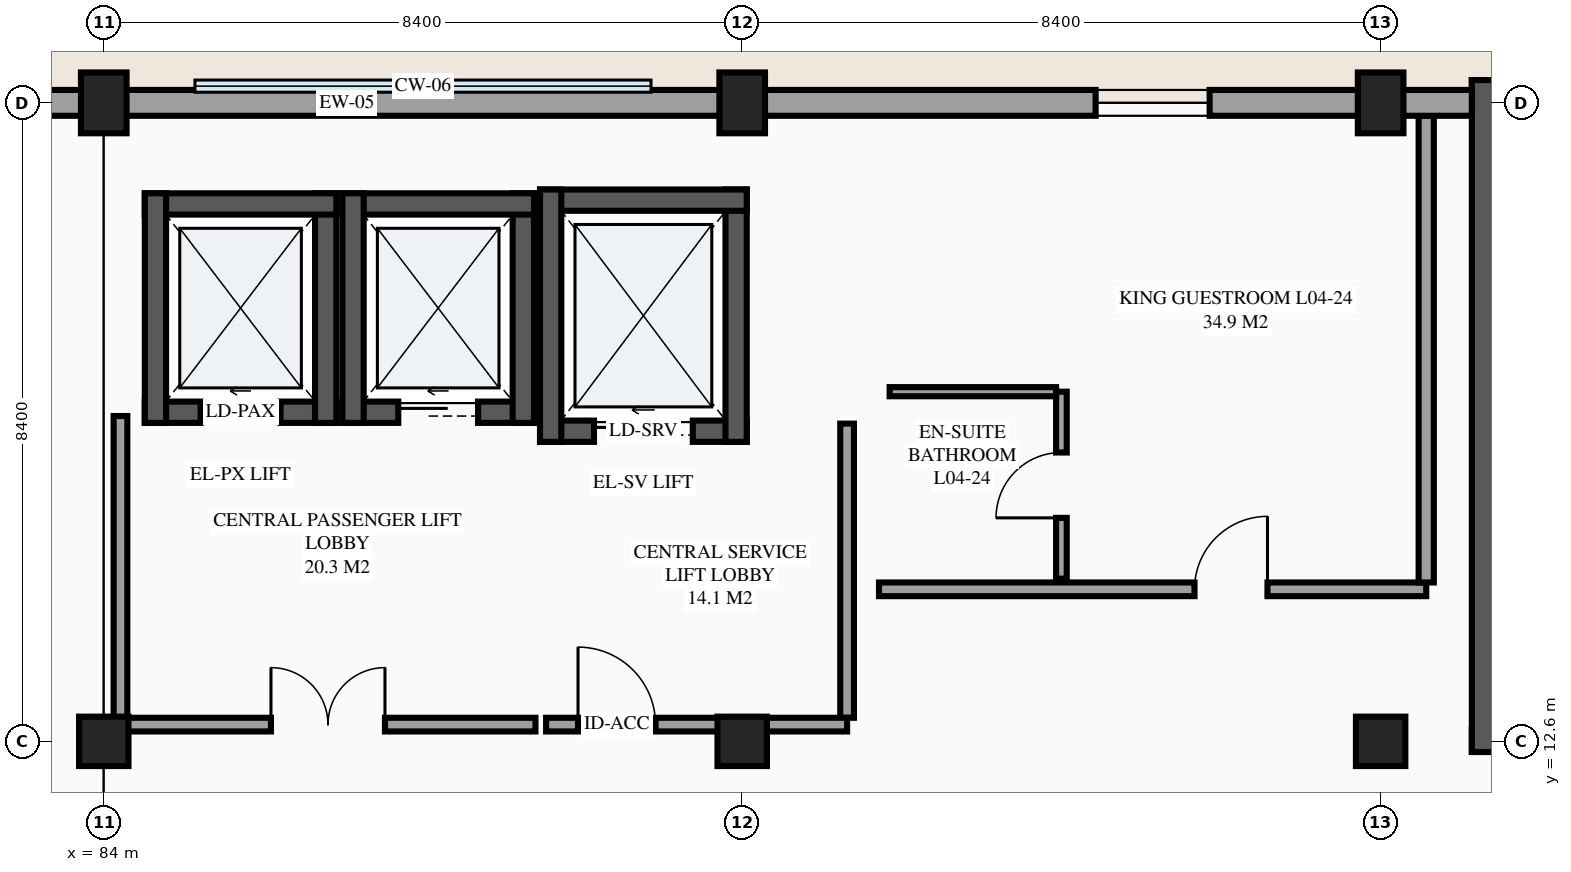
"""IFC4 building model, lengths in metres.
Left out: names, types, materials, properties, quantities, classifications, styles, units other than length and angle.
Written with IfcOpenShell. Run it as: python <this file> out.ifc"""

import sys

from ifc_helpers import new_model, si_unit, direction, frame, frame_2d, origin, origin_2d, place, context, subcontext, project, spatial, rectangle, extrude, element, fill, save


model = new_model("IFC4")
c1 = context("Model", 3, precision=1e-05, world=origin(), true_north=direction((0.0, 1.0)))
c2 = subcontext(c1, "Body", "Model", "MODEL_VIEW")
j1 = project(units=[si_unit("LENGTHUNIT", "METRE"), si_unit("PLANEANGLEUNIT", "RADIAN")], contexts=[c1])
p1 = place(None, origin())
s1 = spatial("IfcSite", under=j1, at=p1, CompositionType="ELEMENT")
p2 = place(p1, origin())
s2 = spatial("IfcBuilding", under=s1, at=p2, CompositionType="ELEMENT")
p3 = place(p2, frame((0.0, 0.0, 18.3)))
s3 = spatial("IfcBuildingStorey", under=s2, at=p3, CompositionType="ELEMENT", Elevation=18.3)
p4 = place(p3, frame((84.0, 12.6, 0.0), z_axis=(0.0, 0.0, 1.0), x_axis=(1.0, 0.0, 0.0)))
e1 = element("IfcColumn", 1, at=p4, inside=s3, PredefinedType="COLUMN", context=c2, shape_type="SweptSolid", body=[
    extrude(rectangle(XDim=0.65, YDim=0.65, at=origin_2d()), origin(), (0.0, 0.0, 1.0), 3.6),
])
p5 = place(p3, frame((84.0, 21.0, 0.0), z_axis=(0.0, 0.0, 1.0), x_axis=(1.0, 0.0, 0.0)))
e2 = element("IfcColumn", 2, at=p5, inside=s3, PredefinedType="COLUMN", context=c2, shape_type="SweptSolid", body=[
    extrude(rectangle(XDim=0.6, YDim=0.8, at=origin_2d()), origin(), (0.0, 0.0, 1.0), 3.6),
])
p6 = place(p3, frame((92.4, 12.6, 0.0), z_axis=(0.0, 0.0, 1.0), x_axis=(1.0, 0.0, 0.0)))
e3 = element("IfcColumn", 3, at=p6, inside=s3, PredefinedType="COLUMN", context=c2, shape_type="SweptSolid", body=[
    extrude(rectangle(XDim=0.65, YDim=0.65, at=origin_2d()), origin(), (0.0, 0.0, 1.0), 3.6),
])
p7 = place(p3, frame((92.4, 21.0, 0.0), z_axis=(0.0, 0.0, 1.0), x_axis=(1.0, 0.0, 0.0)))
e4 = element("IfcColumn", 4, at=p7, inside=s3, PredefinedType="COLUMN", context=c2, shape_type="SweptSolid", body=[
    extrude(rectangle(XDim=0.6, YDim=0.8, at=origin_2d()), origin(), (0.0, 0.0, 1.0), 3.6),
])
p8 = place(p3, frame((100.8, 12.6, 0.0), z_axis=(0.0, 0.0, 1.0), x_axis=(1.0, 0.0, 0.0)))
e5 = element("IfcColumn", 5, at=p8, inside=s3, PredefinedType="COLUMN", context=c2, shape_type="SweptSolid", body=[
    extrude(rectangle(XDim=0.65, YDim=0.65, at=origin_2d()), origin(), (0.0, 0.0, 1.0), 3.6),
])
p9 = place(p3, frame((100.8, 21.0, 0.0), z_axis=(0.0, 0.0, 1.0), x_axis=(1.0, 0.0, 0.0)))
e6 = element("IfcColumn", 6, at=p9, inside=s3, PredefinedType="COLUMN", context=c2, shape_type="SweptSolid", body=[
    extrude(rectangle(XDim=0.6, YDim=0.8, at=origin_2d()), origin(), (0.0, 0.0, 1.0), 3.6),
])
p10 = place(p3, frame((92.4, 21.0, 0.0), z_axis=(0.0, 0.0, 1.0), x_axis=(-1.0, 0.0, 0.0)))
e7 = element("IfcWall", 7, at=p10, inside=s3, PredefinedType="STANDARD", context=c2, shape_type="SweptSolid", body=[
    extrude(rectangle(XDim=10.4, YDim=0.34, at=frame_2d((5.2, 0.0))), origin(), (0.0, 0.0, 1.0), 2.68),
])
p11 = place(p3, frame((84.54, 16.93, 0.0), z_axis=(0.0, 0.0, 1.0), x_axis=(1.0, 0.0, 0.0)))
e8 = element("IfcWall", 8, at=p11, inside=s3, PredefinedType="SHEAR", context=c2, shape_type="SweptSolid", body=[
    extrude(rectangle(XDim=2.52, YDim=0.28, at=frame_2d((1.26, 0.0))), origin(), (0.0, 0.0, 1.0), 3.6),
])
p12 = place(p11, frame((0.735, 0.0, 0.0)))
e9 = element("IfcOpeningElement", 9, at=p12, cuts=e8, PredefinedType="OPENING", context=c2, shape_type="SweptSolid", body=[
    extrude(rectangle(XDim=1.05, YDim=2.2, at=frame_2d((0.525, 1.1))), frame((0.0, 0.15, 0.0), z_axis=(0.0, -1.0, 0.0), x_axis=(1.0, 0.0, 0.0)), (0.0, 0.0, 1.0), 0.3),
])
p13 = place(p3, frame((86.92, 16.79, 0.0), z_axis=(0.0, 0.0, 1.0), x_axis=(0.0, 1.0, 0.0)))
e10 = element("IfcWall", 10, at=p13, inside=s3, PredefinedType="SHEAR", context=c2, shape_type="SweptSolid", body=[
    extrude(rectangle(XDim=3.02, YDim=0.28, at=frame_2d((1.51, 0.0))), origin(), (0.0, 0.0, 1.0), 3.6),
])
p14 = place(p3, frame((87.06, 19.67, 0.0), z_axis=(0.0, 0.0, 1.0), x_axis=(-1.0, 0.0, 0.0)))
e11 = element("IfcWall", 11, at=p14, inside=s3, PredefinedType="SHEAR", context=c2, shape_type="SweptSolid", body=[
    extrude(rectangle(XDim=2.52, YDim=0.28, at=frame_2d((1.26, 0.0))), origin(), (0.0, 0.0, 1.0), 3.6),
])
p15 = place(p3, frame((84.68, 19.81, 0.0), z_axis=(0.0, 0.0, 1.0), x_axis=(0.0, -1.0, 0.0)))
e12 = element("IfcWall", 12, at=p15, inside=s3, PredefinedType="SHEAR", context=c2, shape_type="SweptSolid", body=[
    extrude(rectangle(XDim=3.02, YDim=0.28, at=frame_2d((1.51, 0.0))), origin(), (0.0, 0.0, 1.0), 3.6),
])
p16 = place(p3, frame((87.14, 16.93, 0.0), z_axis=(0.0, 0.0, 1.0), x_axis=(1.0, 0.0, 0.0)))
e13 = element("IfcWall", 13, at=p16, inside=s3, PredefinedType="SHEAR", context=c2, shape_type="SweptSolid", body=[
    extrude(rectangle(XDim=2.52, YDim=0.28, at=frame_2d((1.26, 0.0))), origin(), (0.0, 0.0, 1.0), 3.6),
])
p17 = place(p16, frame((0.735, 0.0, 0.0)))
e14 = element("IfcOpeningElement", 14, at=p17, cuts=e13, PredefinedType="OPENING", context=c2, shape_type="SweptSolid", body=[
    extrude(rectangle(XDim=1.05, YDim=2.2, at=frame_2d((0.525, 1.1))), frame((0.0, 0.15, 0.0), z_axis=(0.0, -1.0, 0.0), x_axis=(1.0, 0.0, 0.0)), (0.0, 0.0, 1.0), 0.3),
])
p18 = place(p3, frame((89.52, 16.79, 0.0), z_axis=(0.0, 0.0, 1.0), x_axis=(0.0, 1.0, 0.0)))
e15 = element("IfcWall", 15, at=p18, inside=s3, PredefinedType="SHEAR", context=c2, shape_type="SweptSolid", body=[
    extrude(rectangle(XDim=3.02, YDim=0.28, at=frame_2d((1.51, 0.0))), origin(), (0.0, 0.0, 1.0), 3.6),
])
p19 = place(p3, frame((89.66, 19.67, 0.0), z_axis=(0.0, 0.0, 1.0), x_axis=(-1.0, 0.0, 0.0)))
e16 = element("IfcWall", 16, at=p19, inside=s3, PredefinedType="SHEAR", context=c2, shape_type="SweptSolid", body=[
    extrude(rectangle(XDim=2.52, YDim=0.28, at=frame_2d((1.26, 0.0))), origin(), (0.0, 0.0, 1.0), 3.6),
])
p20 = place(p3, frame((87.28, 19.81, 0.0), z_axis=(0.0, 0.0, 1.0), x_axis=(0.0, -1.0, 0.0)))
e17 = element("IfcWall", 17, at=p20, inside=s3, PredefinedType="SHEAR", context=c2, shape_type="SweptSolid", body=[
    extrude(rectangle(XDim=3.02, YDim=0.28, at=frame_2d((1.51, 0.0))), origin(), (0.0, 0.0, 1.0), 3.6),
])
p21 = place(p3, frame((89.74, 16.68, 0.0), z_axis=(0.0, 0.0, 1.0), x_axis=(1.0, 0.0, 0.0)))
e18 = element("IfcWall", 18, at=p21, inside=s3, PredefinedType="SHEAR", context=c2, shape_type="SweptSolid", body=[
    extrude(rectangle(XDim=2.72, YDim=0.28, at=frame_2d((1.36, 0.0))), origin(), (0.0, 0.0, 1.0), 3.6),
])
p22 = place(p21, frame((0.71, 0.0, 0.0)))
e19 = element("IfcOpeningElement", 19, at=p22, cuts=e18, PredefinedType="OPENING", context=c2, shape_type="SweptSolid", body=[
    extrude(rectangle(XDim=1.3, YDim=2.25, at=frame_2d((0.65, 1.125))), frame((0.0, 0.15, 0.0), z_axis=(0.0, -1.0, 0.0), x_axis=(1.0, 0.0, 0.0)), (0.0, 0.0, 1.0), 0.3),
])
p23 = place(p3, frame((92.32, 16.54, 0.0), z_axis=(0.0, 0.0, 1.0), x_axis=(0.0, 1.0, 0.0)))
e20 = element("IfcWall", 20, at=p23, inside=s3, PredefinedType="SHEAR", context=c2, shape_type="SweptSolid", body=[
    extrude(rectangle(XDim=3.32, YDim=0.28, at=frame_2d((1.66, 0.0))), origin(), (0.0, 0.0, 1.0), 3.6),
])
p24 = place(p3, frame((92.46, 19.72, 0.0), z_axis=(0.0, 0.0, 1.0), x_axis=(-1.0, 0.0, 0.0)))
e21 = element("IfcWall", 21, at=p24, inside=s3, PredefinedType="SHEAR", context=c2, shape_type="SweptSolid", body=[
    extrude(rectangle(XDim=2.72, YDim=0.28, at=frame_2d((1.36, 0.0))), origin(), (0.0, 0.0, 1.0), 3.6),
])
p25 = place(p3, frame((89.88, 19.86, 0.0), z_axis=(0.0, 0.0, 1.0), x_axis=(0.0, -1.0, 0.0)))
e22 = element("IfcWall", 22, at=p25, inside=s3, PredefinedType="SHEAR", context=c2, shape_type="SweptSolid", body=[
    extrude(rectangle(XDim=3.32, YDim=0.28, at=frame_2d((1.66, 0.0))), origin(), (0.0, 0.0, 1.0), 3.6),
])
p26 = place(p3, frame((102.0, 12.61, 0.0), z_axis=(0.0, 0.0, 1.0), x_axis=(1.0, 0.0, 0.0)))
e23 = element("IfcWall", 23, at=p26, inside=s3, PredefinedType="SHEAR", context=c2, shape_type="SweptSolid", body=[
    extrude(rectangle(XDim=5.2, YDim=0.3, at=frame_2d((2.6, 0.0))), origin(), (0.0, 0.0, 1.0), 3.6),
])
p27 = place(p26, frame((2.025, 0.0, 0.0)))
e24 = element("IfcOpeningElement", 24, at=p27, cuts=e23, PredefinedType="OPENING", context=c2, shape_type="SweptSolid", body=[
    extrude(rectangle(XDim=1.15, YDim=2.15, at=frame_2d((0.575, 1.075))), frame((0.0, 0.16, 0.0), z_axis=(0.0, -1.0, 0.0), x_axis=(1.0, 0.0, 0.0)), (0.0, 0.0, 1.0), 0.32),
])
p28 = place(p3, frame((107.2, 21.15, 0.0), z_axis=(0.0, 0.0, 1.0), x_axis=(-1.0, 0.0, 0.0)))
e25 = element("IfcWall", 25, at=p28, inside=s3, PredefinedType="SHEAR", context=c2, shape_type="SweptSolid", body=[
    extrude(rectangle(XDim=5.2, YDim=0.3, at=frame_2d((2.6, 0.0))), origin(), (0.0, 0.0, 1.0), 3.6),
])
p29 = place(p3, frame((102.15, 21.3, 0.0), z_axis=(0.0, 0.0, 1.0), x_axis=(0.0, -1.0, 0.0)))
e26 = element("IfcWall", 26, at=p29, inside=s3, PredefinedType="SHEAR", context=c2, shape_type="SweptSolid", body=[
    extrude(rectangle(XDim=8.84, YDim=0.3, at=frame_2d((4.42, 0.0))), origin(), (0.0, 0.0, 1.0), 3.6),
])
p30 = place(p3, frame((94.2, 14.6, 0.0), z_axis=(0.0, 0.0, 1.0), x_axis=(1.0, 0.0, 0.0)))
e27 = element("IfcWall", 27, at=p30, inside=s3, PredefinedType="PARTITIONING", context=c2, shape_type="SweptSolid", body=[
    extrude(rectangle(XDim=7.2, YDim=0.18, at=frame_2d((3.6, 0.0))), origin(), (0.0, 0.0, 1.0), 3.375),
])
p31 = place(p30, frame((4.151, 0.0, 0.0)))
e28 = element("IfcOpeningElement", 28, at=p31, cuts=e27, PredefinedType="OPENING", context=c2, shape_type="SweptSolid", body=[
    extrude(rectangle(XDim=0.96, YDim=2.15, at=frame_2d((0.48, 1.075))), frame((0.0, 0.1, 0.0), z_axis=(0.0, -1.0, 0.0), x_axis=(1.0, 0.0, 0.0)), (0.0, 0.0, 1.0), 0.2),
])
p32 = place(p3, frame((101.4, 14.69, 0.0), z_axis=(0.0, 0.0, 1.0), x_axis=(0.0, 1.0, 0.0)))
e29 = element("IfcWall", 29, at=p32, inside=s3, PredefinedType="PARTITIONING", context=c2, shape_type="SweptSolid", body=[
    extrude(rectangle(XDim=6.14, YDim=0.2, at=frame_2d((3.07, 0.0))), origin(), (0.0, 0.0, 1.0), 3.375),
])
p33 = place(p3, frame((96.6, 14.74, 0.0), z_axis=(0.0, 0.0, 1.0), x_axis=(0.0, 1.0, 0.0)))
e30 = element("IfcWall", 30, at=p33, inside=s3, PredefinedType="PARTITIONING", context=c2, shape_type="SweptSolid", body=[
    extrude(rectangle(XDim=2.46, YDim=0.14, at=frame_2d((1.23, 0.0))), origin(), (0.0, 0.0, 1.0), 3.375),
])
p34 = place(p33, frame((0.8, 0.0, 0.0)))
e31 = element("IfcOpeningElement", 31, at=p34, cuts=e30, PredefinedType="OPENING", context=c2, shape_type="SweptSolid", body=[
    extrude(rectangle(XDim=0.86, YDim=2.1, at=frame_2d((0.43, 1.05))), frame((0.0, 0.08, 0.0), z_axis=(0.0, -1.0, 0.0), x_axis=(1.0, 0.0, 0.0)), (0.0, 0.0, 1.0), 0.16),
])
p35 = place(p3, frame((94.34, 17.2, 0.0), z_axis=(0.0, 0.0, 1.0), x_axis=(1.0, 0.0, 0.0)))
e32 = element("IfcWall", 32, at=p35, inside=s3, PredefinedType="PARTITIONING", context=c2, shape_type="SweptSolid", body=[
    extrude(rectangle(XDim=2.19, YDim=0.12, at=frame_2d((1.095, 0.0))), origin(), (0.0, 0.0, 1.0), 3.375),
])
p36 = place(p3, frame((84.22, 12.82, 0.0), z_axis=(0.0, 0.0, 1.0), x_axis=(1.0, 0.0, 0.0)))
e33 = element("IfcWall", 33, at=p36, inside=s3, PredefinedType="PARTITIONING", context=c2, shape_type="SweptSolid", body=[
    extrude(rectangle(XDim=5.46, YDim=0.18, at=frame_2d((2.73, 0.0))), origin(), (0.0, 0.0, 1.0), 2.43),
])
p37 = place(p36, frame((1.98, 0.0, 0.0)))
e34 = element("IfcOpeningElement", 34, at=p37, cuts=e33, PredefinedType="OPENING", context=c2, shape_type="SweptSolid", body=[
    extrude(rectangle(XDim=1.5, YDim=2.15, at=frame_2d((0.75, 1.075))), frame((0.0, 0.1, 0.0), z_axis=(0.0, -1.0, 0.0), x_axis=(1.0, 0.0, 0.0)), (0.0, 0.0, 1.0), 0.2),
])
p38 = place(p3, frame((84.22, 12.91, 0.0), z_axis=(0.0, 0.0, 1.0), x_axis=(0.0, 1.0, 0.0)))
e35 = element("IfcWall", 35, at=p38, inside=s3, PredefinedType="PARTITIONING", context=c2, shape_type="SweptSolid", body=[
    extrude(rectangle(XDim=3.97, YDim=0.18, at=frame_2d((1.985, 0.0))), origin(), (0.0, 0.0, 1.0), 2.43),
])
p39 = place(p3, frame((89.82, 12.82, 0.0), z_axis=(0.0, 0.0, 1.0), x_axis=(1.0, 0.0, 0.0)))
e36 = element("IfcWall", 36, at=p39, inside=s3, PredefinedType="PARTITIONING", context=c2, shape_type="SweptSolid", body=[
    extrude(rectangle(XDim=2.58, YDim=0.18, at=frame_2d((1.29, 0.0))), origin(), (0.0, 0.0, 1.0), 2.43),
])
p40 = place(p39, frame((0.42, 0.0, 0.0)))
e37 = element("IfcOpeningElement", 37, at=p40, cuts=e36, PredefinedType="OPENING", context=c2, shape_type="SweptSolid", body=[
    extrude(rectangle(XDim=1.02, YDim=2.15, at=frame_2d((0.51, 1.075))), frame((0.0, 0.1, 0.0), z_axis=(0.0, -1.0, 0.0), x_axis=(1.0, 0.0, 0.0)), (0.0, 0.0, 1.0), 0.2),
])
p41 = place(p3, frame((93.78, 12.91, 0.0), z_axis=(0.0, 0.0, 1.0), x_axis=(0.0, 1.0, 0.0)))
e38 = element("IfcWall", 38, at=p41, inside=s3, PredefinedType="PARTITIONING", context=c2, shape_type="SweptSolid", body=[
    extrude(rectangle(XDim=3.87, YDim=0.18, at=frame_2d((1.935, 0.0))), origin(), (0.0, 0.0, 1.0), 3.375),
])
p42 = place(p3, frame((102.0, 21.0, 0.0), z_axis=(0.0, 0.0, 1.0), x_axis=(-1.0, 0.0, 0.0)))
e39 = element("IfcWall", 39, at=p42, inside=s3, PredefinedType="STANDARD", context=c2, shape_type="SweptSolid", body=[
    extrude(rectangle(XDim=1.2, YDim=0.34, at=frame_2d((0.6, 0.0))), origin(), (0.0, 0.0, 1.0), 2.43),
])
p43 = place(p3, frame((100.8, 21.0, 0.0), z_axis=(0.0, 0.0, 1.0), x_axis=(-1.0, 0.0, 0.0)))
e40 = element("IfcWall", 40, at=p43, inside=s3, PredefinedType="STANDARD", context=c2, shape_type="SweptSolid", body=[
    extrude(rectangle(XDim=8.4, YDim=0.34, at=frame_2d((4.2, 0.0))), origin(), (0.0, 0.0, 1.0), 3.126),
])
p44 = place(p43, frame((2.25, 0.0, 0.85)))
e41 = element("IfcOpeningElement", 41, at=p44, cuts=e40, PredefinedType="OPENING", context=c2, shape_type="SweptSolid", body=[
    extrude(rectangle(XDim=1.5, YDim=1.5, at=frame_2d((0.75, 0.75))), frame((0.0, 0.18, 0.0), z_axis=(0.0, -1.0, 0.0), x_axis=(1.0, 0.0, 0.0)), (0.0, 0.0, 1.0), 0.36),
])
p45 = place(p3, frame((92.4, 12.82, 0.0), z_axis=(0.0, 0.0, 1.0), x_axis=(1.0, 0.0, 0.0)))
e42 = element("IfcWall", 42, at=p45, inside=s3, PredefinedType="PARTITIONING", context=c2, shape_type="SweptSolid", body=[
    extrude(rectangle(XDim=1.38, YDim=0.18, at=frame_2d((0.69, 0.0))), origin(), (0.0, 0.0, 1.0), 2.53),
])
p46 = place(p44, origin())
e43 = element("IfcWindow", 43, at=p46, inside=s3, PartitioningType="SINGLE_PANEL", PredefinedType="WINDOW", context=c2, shape_type="SweptSolid", body=[
    extrude(rectangle(XDim=1.5, YDim=1.5, at=frame_2d((0.75, 0.75))), frame((0.0, 0.03, 0.0), z_axis=(0.0, -1.0, 0.0), x_axis=(1.0, 0.0, 0.0)), (0.0, 0.0, 1.0), 0.06),
])
fill(e41, e43)
p47 = place(p12, origin())
e44 = element("IfcDoor", 44, at=p47, inside=s3, OperationType="SLIDING_TO_LEFT", PredefinedType="DOOR", context=c2, shape_type="SweptSolid", body=[
    extrude(rectangle(XDim=1.05, YDim=2.2, at=frame_2d((0.525, 1.1))), frame((0.0, 0.025, 0.0), z_axis=(0.0, -1.0, 0.0), x_axis=(1.0, 0.0, 0.0)), (0.0, 0.0, 1.0), 0.05),
])
fill(e9, e44)
p48 = place(p17, origin())
e45 = element("IfcDoor", 45, at=p48, inside=s3, OperationType="SLIDING_TO_LEFT", PredefinedType="DOOR", context=c2, shape_type="SweptSolid", body=[
    extrude(rectangle(XDim=1.05, YDim=2.2, at=frame_2d((0.525, 1.1))), frame((0.0, 0.025, 0.0), z_axis=(0.0, -1.0, 0.0), x_axis=(1.0, 0.0, 0.0)), (0.0, 0.0, 1.0), 0.05),
])
fill(e14, e45)
p49 = place(p22, origin())
e46 = element("IfcDoor", 46, at=p49, inside=s3, OperationType="SLIDING_TO_LEFT", PredefinedType="DOOR", context=c2, shape_type="SweptSolid", body=[
    extrude(rectangle(XDim=1.3, YDim=2.25, at=frame_2d((0.65, 1.125))), frame((0.0, 0.025, 0.0), z_axis=(0.0, -1.0, 0.0), x_axis=(1.0, 0.0, 0.0)), (0.0, 0.0, 1.0), 0.05),
])
fill(e19, e46)
p50 = place(p31, origin())
e47 = element("IfcDoor", 47, at=p50, inside=s3, OperationType="SINGLE_SWING_RIGHT", PredefinedType="DOOR", context=c2, shape_type="SweptSolid", body=[
    extrude(rectangle(XDim=0.96, YDim=2.15, at=frame_2d((0.48, 1.075))), frame((0.0, 0.025, 0.0), z_axis=(0.0, -1.0, 0.0), x_axis=(1.0, 0.0, 0.0)), (0.0, 0.0, 1.0), 0.05),
])
fill(e28, e47)
p51 = place(p34, origin())
e48 = element("IfcDoor", 48, at=p51, inside=s3, OperationType="SINGLE_SWING_LEFT", PredefinedType="DOOR", context=c2, shape_type="SweptSolid", body=[
    extrude(rectangle(XDim=0.86, YDim=2.1, at=frame_2d((0.43, 1.05))), frame((0.0, 0.025, 0.0), z_axis=(0.0, -1.0, 0.0), x_axis=(1.0, 0.0, 0.0)), (0.0, 0.0, 1.0), 0.05),
])
fill(e31, e48)
p52 = place(p37, origin())
e49 = element("IfcDoor", 49, at=p52, inside=s3, OperationType="DOUBLE_DOOR_SINGLE_SWING", PredefinedType="DOOR", context=c2, shape_type="SweptSolid", body=[
    extrude(rectangle(XDim=1.5, YDim=2.15, at=frame_2d((0.75, 1.075))), frame((0.0, 0.025, 0.0), z_axis=(0.0, -1.0, 0.0), x_axis=(1.0, 0.0, 0.0)), (0.0, 0.0, 1.0), 0.05),
])
fill(e34, e49)
p53 = place(p40, origin())
e50 = element("IfcDoor", 50, at=p53, inside=s3, OperationType="SINGLE_SWING_LEFT", PredefinedType="DOOR", context=c2, shape_type="SweptSolid", body=[
    extrude(rectangle(XDim=1.02, YDim=2.15, at=frame_2d((0.51, 1.075))), frame((0.0, 0.025, 0.0), z_axis=(0.0, -1.0, 0.0), x_axis=(1.0, 0.0, 0.0)), (0.0, 0.0, 1.0), 0.05),
])
fill(e37, e50)
save(model, sys.argv[1])
